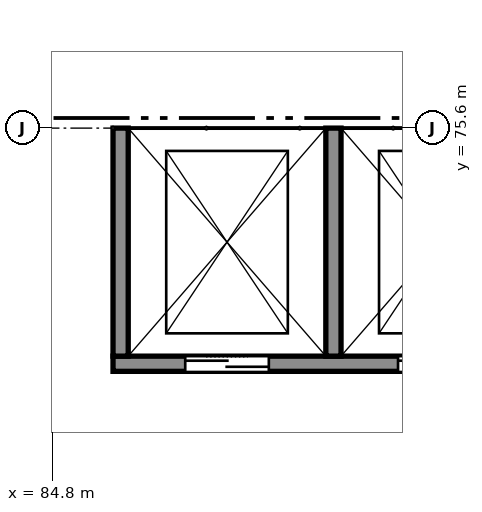
"""IFC4 building model, lengths in metres.
Left out: names, types, materials, properties, quantities, classifications, styles, units other than length and angle.
Written with IfcOpenShell. Run it as: python <this file> out.ifc"""

import sys

from ifc_helpers import new_model, si_unit, direction, frame, frame_2d, origin, place, context, subcontext, project, spatial, rectangle, extrude, element, fill, save


model = new_model("IFC4")
c1 = context("Model", 3, precision=1e-05, world=origin(), true_north=direction((0.0, 1.0)))
c2 = subcontext(c1, "Body", "Model", "MODEL_VIEW")
j1 = project(units=[si_unit("LENGTHUNIT", "METRE"), si_unit("PLANEANGLEUNIT", "RADIAN")], contexts=[c1])
p1 = place(None, origin())
s1 = spatial("IfcSite", under=j1, at=p1, CompositionType="ELEMENT")
p2 = place(p1, origin())
s2 = spatial("IfcBuilding", under=s1, at=p2, CompositionType="ELEMENT")
p3 = place(p2, origin())
s3 = spatial("IfcBuildingStorey", under=s2, at=p3, CompositionType="ELEMENT", Elevation=0.0)
p4 = place(p3, frame((85.6, 72.5, -1.8), z_axis=(0.0, 0.0, 1.0), x_axis=(1.0, 0.0, 0.0)))
e1 = element("IfcWall", 1, at=p4, inside=s3, PredefinedType="SHEAR", context=c2, shape_type="SweptSolid", body=[
    extrude(rectangle(XDim=8.6, YDim=0.2, at=frame_2d((4.3, 0.0))), origin(), (0.0, 0.0, 1.0), 7.3),
])
p5 = place(p4, frame((0.95, 0.0, 1.8)))
e2 = element("IfcOpeningElement", 2, at=p5, cuts=e1, PredefinedType="OPENING", context=c2, shape_type="SweptSolid", body=[
    extrude(rectangle(XDim=1.1, YDim=2.1, at=frame_2d((0.55, 1.05))), frame((0.0, 0.11, 0.0), z_axis=(0.0, -1.0, 0.0), x_axis=(1.0, 0.0, 0.0)), (0.0, 0.0, 1.0), 0.22),
])
p6 = place(p4, frame((3.75, 0.0, 1.8)))
e3 = element("IfcOpeningElement", 3, at=p6, cuts=e1, PredefinedType="OPENING", context=c2, shape_type="SweptSolid", body=[
    extrude(rectangle(XDim=1.1, YDim=2.1, at=frame_2d((0.55, 1.05))), frame((0.0, 0.11, 0.0), z_axis=(0.0, -1.0, 0.0), x_axis=(1.0, 0.0, 0.0)), (0.0, 0.0, 1.0), 0.22),
])
p7 = place(p4, frame((6.55, 0.0, 1.8)))
e4 = element("IfcOpeningElement", 4, at=p7, cuts=e1, PredefinedType="OPENING", context=c2, shape_type="SweptSolid", body=[
    extrude(rectangle(XDim=1.1, YDim=2.1, at=frame_2d((0.55, 1.05))), frame((0.0, 0.11, 0.0), z_axis=(0.0, -1.0, 0.0), x_axis=(1.0, 0.0, 0.0)), (0.0, 0.0, 1.0), 0.22),
])
for number, where, z_axis, x_axis in (
    (5, (85.7, 72.6, -1.8), (0.0, 0.0, 1.0), (0.0, 1.0, 0.0)),
    (6, (88.5, 72.6, -1.8), (0.0, 0.0, 1.0), (0.0, 1.0, 0.0)),
):
    element("IfcWall", number, at=place(p3, frame(where, z_axis=z_axis, x_axis=x_axis)), inside=s3, PredefinedType="SHEAR", context=c2, shape_type="SweptSolid", body=[
        extrude(rectangle(XDim=3.0, YDim=0.2, at=frame_2d((1.5, 0.0))), origin(), (0.0, 0.0, 1.0), 7.3),
    ])
p8 = place(p5, origin())
e7 = element("IfcDoor", 7, at=p8, inside=s3, OperationType="DOUBLE_DOOR_SLIDING", PredefinedType="DOOR", context=c2, shape_type="SweptSolid", body=[
    extrude(rectangle(XDim=1.1, YDim=2.1, at=frame_2d((0.55, 1.05))), frame((0.0, 0.025, 0.0), z_axis=(0.0, -1.0, 0.0), x_axis=(1.0, 0.0, 0.0)), (0.0, 0.0, 1.0), 0.05),
])
fill(e2, e7)
p9 = place(p6, origin())
e8 = element("IfcDoor", 8, at=p9, inside=s3, OperationType="DOUBLE_DOOR_SLIDING", PredefinedType="DOOR", context=c2, shape_type="SweptSolid", body=[
    extrude(rectangle(XDim=1.1, YDim=2.1, at=frame_2d((0.55, 1.05))), frame((0.0, 0.025, 0.0), z_axis=(0.0, -1.0, 0.0), x_axis=(1.0, 0.0, 0.0)), (0.0, 0.0, 1.0), 0.05),
])
fill(e3, e8)
save(model, sys.argv[1])
